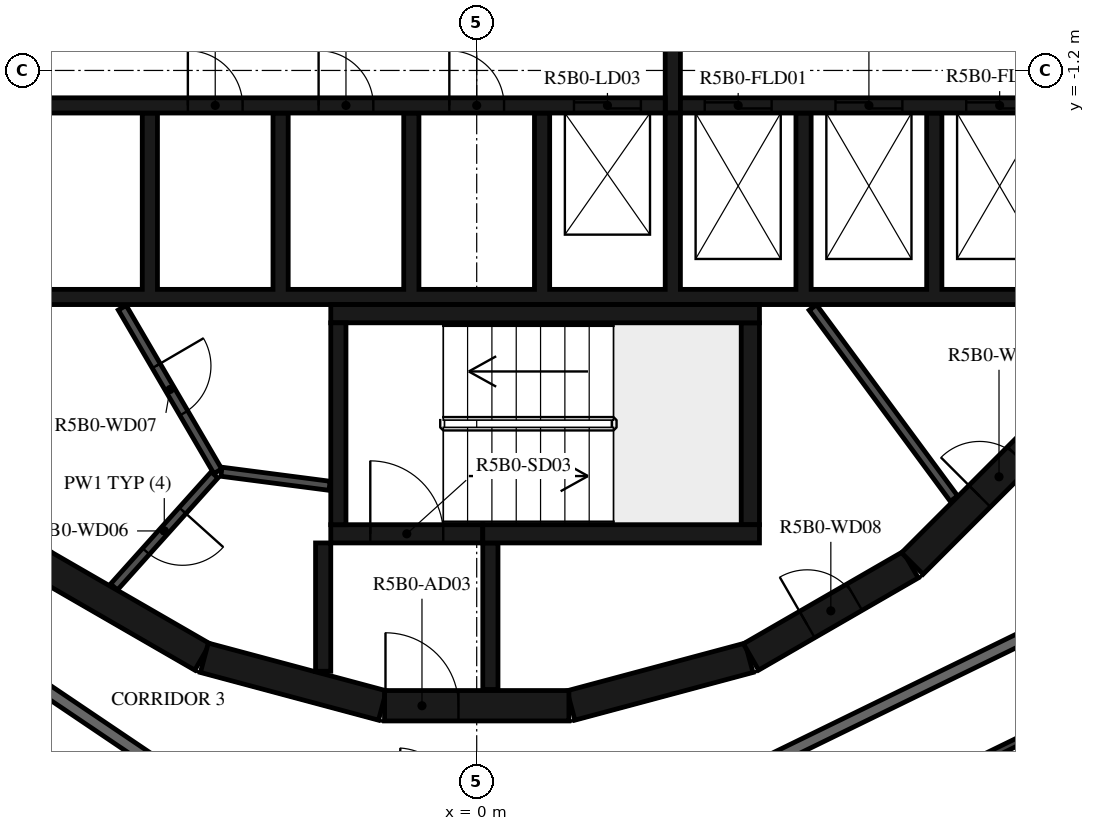
"""IFC4 building model, lengths in metres.
Left out: names, types, materials, properties, quantities, classifications, styles, units other than length and angle.
Written with IfcOpenShell. Run it as: python <this file> out.ifc"""

import sys

from ifc_helpers import new_model, si_unit, direction, frame, frame_2d, origin, place, context, subcontext, project, spatial, polyline, rectangle, outline, extrude, element, fill, save


model = new_model("IFC4")
c1 = context("Model", 3, precision=1e-05, world=origin(), true_north=direction((0.0, 1.0)))
c2 = subcontext(c1, "Body", "Model", "MODEL_VIEW")
j1 = project(units=[si_unit("LENGTHUNIT", "METRE"), si_unit("PLANEANGLEUNIT", "RADIAN")], contexts=[c1])
p1 = place(None, origin())
s1 = spatial("IfcSite", under=j1, at=p1, CompositionType="ELEMENT")
p2 = place(p1, origin())
s2 = spatial("IfcBuilding", under=s1, at=p2, CompositionType="ELEMENT")
p3 = place(p2, frame((0.0, 0.0, 202.4)))
s3 = spatial("IfcBuildingStorey", under=s2, at=p3, CompositionType="ELEMENT", Elevation=202.4)
p4 = place(p3, frame((1.55, -11.643, 0.0), z_axis=(0.0, 0.0, 1.0), x_axis=(0.965948410781, 0.258734743916, 0.0)))
e1 = element("IfcWall", 1, at=p4, inside=s3, PredefinedType="SHEAR", context=c2, shape_type="SweptSolid", body=[
    extrude(rectangle(XDim=3.033, YDim=0.5, at=frame_2d((1.516, 0.0))), origin(), (0.0, 0.0, 1.0), 3.12),
])
p5 = place(p3, frame((4.51, -10.845, 0.0), z_axis=(0.0, 0.0, 1.0), x_axis=(0.865975092491, 0.500087131594, 0.0)))
e2 = element("IfcWall", 2, at=p5, inside=s3, PredefinedType="SHEAR", context=c2, shape_type="SweptSolid", body=[
    extrude(rectangle(XDim=3.033, YDim=0.5, at=frame_2d((1.516, 0.0))), origin(), (0.0, 0.0, 1.0), 3.12),
])
p6 = place(p5, frame((1.066, 0.0, 0.0)))
e3 = element("IfcOpeningElement", 3, at=p6, cuts=e2, PredefinedType="OPENING", context=c2, shape_type="SweptSolid", body=[
    extrude(rectangle(XDim=0.9, YDim=2.1, at=frame_2d((0.45, 1.05))), frame((0.0, 0.26, 0.0), z_axis=(0.0, -1.0, 0.0), x_axis=(1.0, 0.0, 0.0)), (0.0, 0.0, 1.0), 0.52),
])
p7 = place(p3, frame((7.164, -9.308, 0.0), z_axis=(0.0, 0.0, 1.0), x_axis=(0.707106781187, 0.707106781187, 0.0)))
e4 = element("IfcWall", 4, at=p7, inside=s3, PredefinedType="SHEAR", context=c2, shape_type="SweptSolid", body=[
    extrude(rectangle(XDim=3.032, YDim=0.5, at=frame_2d((1.516, 0.0))), origin(), (0.0, 0.0, 1.0), 3.12),
])
p8 = place(p7, frame((1.566, 0.0, 0.0)))
e5 = element("IfcOpeningElement", 5, at=p8, cuts=e4, PredefinedType="OPENING", context=c2, shape_type="SweptSolid", body=[
    extrude(rectangle(XDim=0.9, YDim=2.1, at=frame_2d((0.45, 1.05))), frame((0.0, 0.26, 0.0), z_axis=(0.0, -1.0, 0.0), x_axis=(1.0, 0.0, 0.0)), (0.0, 0.0, 1.0), 0.52),
])
for number, where, z_axis, x_axis in (
    (6, (-7.137, -9.329, 0.0), (0.0, 0.0, 1.0), (0.866, -0.5, 0.0)),
    (7, (-4.479, -10.858, 0.0), (0.0, 0.0, 1.0), (0.966, -0.259, 0.0)),
):
    element("IfcWall", number, at=place(p3, frame(where, z_axis=z_axis, x_axis=x_axis)), inside=s3, PredefinedType="SHEAR", context=c2, shape_type="SweptSolid", body=[
        extrude(rectangle(XDim=3.033, YDim=0.5, at=frame_2d((1.516, 0.0))), origin(), (0.0, 0.0, 1.0), 3.12),
    ])
p9 = place(p3, frame((-1.516, -11.647, 0.0), z_axis=(0.0, 0.0, 1.0), x_axis=(1.0, 0.0, 0.0)))
e8 = element("IfcWall", 8, at=p9, inside=s3, PredefinedType="SHEAR", context=c2, shape_type="SweptSolid", body=[
    extrude(rectangle(XDim=3.033, YDim=0.5, at=frame_2d((1.516, 0.0))), origin(), (0.0, 0.0, 1.0), 3.12),
])
p10 = place(p9, frame((0.016, 0.0, 0.0)))
e9 = element("IfcOpeningElement", 9, at=p10, cuts=e8, PredefinedType="OPENING", context=c2, shape_type="SweptSolid", body=[
    extrude(rectangle(XDim=1.2, YDim=2.1, at=frame_2d((0.6, 1.05))), frame((0.0, 0.26, 0.0), z_axis=(0.0, -1.0, 0.0), x_axis=(1.0, 0.0, 0.0)), (0.0, 0.0, 1.0), 0.52),
])
p11 = place(p3, frame((-2.275, -8.67, 0.0), z_axis=(0.0, 0.0, 1.0), x_axis=(0.0, 1.0, 0.0)))
e10 = element("IfcWall", 10, at=p11, inside=s3, PredefinedType="SHEAR", context=c2, shape_type="SweptSolid", body=[
    extrude(rectangle(XDim=3.32, YDim=0.25, at=frame_2d((1.66, 0.0))), origin(), (0.0, 0.0, 1.0), 3.12),
])
p12 = place(p3, frame((-2.4, -5.2, 0.0), z_axis=(0.0, 0.0, 1.0), x_axis=(1.0, 0.0, 0.0)))
e11 = element("IfcWall", 11, at=p12, inside=s3, PredefinedType="SHEAR", context=c2, shape_type="SweptSolid", body=[
    extrude(rectangle(XDim=7.05, YDim=0.3, at=frame_2d((3.525, 0.0))), origin(), (0.0, 0.0, 1.0), 3.12),
])
p13 = place(p3, frame((4.5, -8.67, 0.0), z_axis=(0.0, 0.0, 1.0), x_axis=(0.0, 1.0, 0.0)))
e12 = element("IfcWall", 12, at=p13, inside=s3, PredefinedType="SHEAR", context=c2, shape_type="SweptSolid", body=[
    extrude(rectangle(XDim=3.32, YDim=0.3, at=frame_2d((1.66, 0.0))), origin(), (0.0, 0.0, 1.0), 3.12),
])
p14 = place(p3, frame((0.1, -8.82, 0.0), z_axis=(0.0, 0.0, 1.0), x_axis=(1.0, 0.0, 0.0)))
e13 = element("IfcWall", 13, at=p14, inside=s3, PredefinedType="SHEAR", context=c2, shape_type="SweptSolid", body=[
    extrude(rectangle(XDim=4.55, YDim=0.3, at=frame_2d((2.275, 0.0))), origin(), (0.0, 0.0, 1.0), 3.12),
])
p15 = place(p3, frame((-2.4, -8.82, 0.0), z_axis=(0.0, 0.0, 1.0), x_axis=(1.0, 0.0, 0.0)))
e14 = element("IfcWall", 14, at=p15, inside=s3, PredefinedType="SHEAR", context=c2, shape_type="SweptSolid", body=[
    extrude(rectangle(XDim=2.5, YDim=0.3, at=frame_2d((1.25, 0.0))), origin(), (0.0, 0.0, 1.0), 3.12),
])
p16 = place(p15, frame((0.65, 0.0, 0.0)))
e15 = element("IfcOpeningElement", 15, at=p16, cuts=e14, PredefinedType="OPENING", context=c2, shape_type="SweptSolid", body=[
    extrude(rectangle(XDim=1.2, YDim=2.1, at=frame_2d((0.6, 1.05))), frame((0.0, 0.16, 0.0), z_axis=(0.0, -1.0, 0.0), x_axis=(1.0, 0.0, 0.0)), (0.0, 0.0, 1.0), 0.32),
])
p17 = place(p3, frame((-2.525, -8.97, 0.0), z_axis=(0.0, 0.0, 1.0), x_axis=(0.0, -1.0, 0.0)))
e16 = element("IfcWall", 16, at=p17, inside=s3, PredefinedType="SHEAR", context=c2, shape_type="SweptSolid", body=[
    extrude(rectangle(XDim=2.11, YDim=0.25, at=frame_2d((1.055, 0.0))), origin(), (0.0, 0.0, 1.0), 3.12),
])
p18 = place(p3, frame((0.225, -8.97, 0.0), z_axis=(0.0, 0.0, 1.0), x_axis=(0.0, -1.0, 0.0)))
e17 = element("IfcWall", 17, at=p18, inside=s3, PredefinedType="SHEAR", context=c2, shape_type="SweptSolid", body=[
    extrude(rectangle(XDim=2.41, YDim=0.25, at=frame_2d((1.205, 0.0))), origin(), (0.0, 0.0, 1.0), 3.12),
])
p19 = place(p3, origin())
e18 = element("IfcWall", 18, at=p19, inside=s3, PredefinedType="SHEAR", context=c2, shape_type="SweptSolid", body=[
    extrude(outline(polyline([(9.8, -5.05), (9.8, -4.8), (9.8, -1.9), (9.55, -1.9), (9.55, -4.8), (7.65, -4.8), (7.65, -1.9), (7.4, -1.9), (7.4, -4.8), (5.5, -4.8), (5.5, -1.9), (5.25, -1.9), (5.25, -4.8), (3.35, -4.8), (3.35, -1.9), (3.1, -1.9), (3.1, -4.8), (1.2, -4.8), (1.2, -1.9), (0.95, -1.9), (0.95, -4.8), (-0.95, -4.8), (-0.95, -1.9), (-1.2, -1.9), (-1.2, -4.8), (-3.1, -4.8), (-3.1, -1.9), (-3.35, -1.9), (-3.35, -4.8), (-5.25, -4.8), (-5.25, -1.9), (-5.5, -1.9), (-5.5, -4.8), (-7.4, -4.8), (-7.4, -1.9), (-7.65, -1.9), (-7.65, -4.8), (-9.55, -4.8), (-9.55, -1.9), (-9.8, -1.9), (-9.8, -4.8), (-9.8, -5.05), (9.8, -5.05)])), origin(), (0.0, 0.0, 1.0), 3.12),
])
p20 = place(p3, frame((-11.28, -1.775, 0.0), z_axis=(0.0, 0.0, 1.0), x_axis=(1.0, 0.0, 0.0)))
e19 = element("IfcWall", 19, at=p20, inside=s3, PredefinedType="SHEAR", context=c2, shape_type="SweptSolid", body=[
    extrude(rectangle(XDim=14.38, YDim=0.25, at=frame_2d((7.19, 0.0))), origin(), (0.0, 0.0, 1.0), 3.12),
])
p21 = place(p20, frame((12.88, 0.0, 0.0)))
e20 = element("IfcOpeningElement", 20, at=p21, cuts=e19, PredefinedType="OPENING", context=c2, shape_type="SweptSolid", body=[
    extrude(rectangle(XDim=1.1, YDim=2.1, at=frame_2d((0.55, 1.05))), frame((0.0, 0.135, 0.0), z_axis=(0.0, -1.0, 0.0), x_axis=(1.0, 0.0, 0.0)), (0.0, 0.0, 1.0), 0.27),
])
p22 = place(p20, frame((6.53, 0.0, 0.0)))
e21 = element("IfcOpeningElement", 21, at=p22, cuts=e19, PredefinedType="OPENING", context=c2, shape_type="SweptSolid", body=[
    extrude(rectangle(XDim=0.9, YDim=2.1, at=frame_2d((0.45, 1.05))), frame((0.0, 0.135, 0.0), z_axis=(0.0, -1.0, 0.0), x_axis=(1.0, 0.0, 0.0)), (0.0, 0.0, 1.0), 0.27),
])
p23 = place(p20, frame((8.68, 0.0, 0.0)))
e22 = element("IfcOpeningElement", 22, at=p23, cuts=e19, PredefinedType="OPENING", context=c2, shape_type="SweptSolid", body=[
    extrude(rectangle(XDim=0.9, YDim=2.1, at=frame_2d((0.45, 1.05))), frame((0.0, 0.135, 0.0), z_axis=(0.0, -1.0, 0.0), x_axis=(1.0, 0.0, 0.0)), (0.0, 0.0, 1.0), 0.27),
])
p24 = place(p20, frame((10.83, 0.0, 0.0)))
e23 = element("IfcOpeningElement", 23, at=p24, cuts=e19, PredefinedType="OPENING", context=c2, shape_type="SweptSolid", body=[
    extrude(rectangle(XDim=0.9, YDim=2.1, at=frame_2d((0.45, 1.05))), frame((0.0, 0.135, 0.0), z_axis=(0.0, -1.0, 0.0), x_axis=(1.0, 0.0, 0.0)), (0.0, 0.0, 1.0), 0.27),
])
p25 = place(p3, frame((3.35, -1.775, 0.0), z_axis=(0.0, 0.0, 1.0), x_axis=(1.0, 0.0, 0.0)))
e24 = element("IfcWall", 24, at=p25, inside=s3, PredefinedType="SHEAR", context=c2, shape_type="SweptSolid", body=[
    extrude(rectangle(XDim=7.93, YDim=0.25, at=frame_2d((3.965, 0.0))), origin(), (0.0, 0.0, 1.0), 3.12),
])
p26 = place(p25, frame((0.4, 0.0, 0.0)))
e25 = element("IfcOpeningElement", 25, at=p26, cuts=e24, PredefinedType="OPENING", context=c2, shape_type="SweptSolid", body=[
    extrude(rectangle(XDim=1.1, YDim=2.4, at=frame_2d((0.55, 1.2))), frame((0.0, 0.135, 0.0), z_axis=(0.0, -1.0, 0.0), x_axis=(1.0, 0.0, 0.0)), (0.0, 0.0, 1.0), 0.27),
])
p27 = place(p25, frame((2.55, 0.0, 0.0)))
e26 = element("IfcOpeningElement", 26, at=p27, cuts=e24, PredefinedType="OPENING", context=c2, shape_type="SweptSolid", body=[
    extrude(rectangle(XDim=1.1, YDim=2.4, at=frame_2d((0.55, 1.2))), frame((0.0, 0.135, 0.0), z_axis=(0.0, -1.0, 0.0), x_axis=(1.0, 0.0, 0.0)), (0.0, 0.0, 1.0), 0.27),
])
p28 = place(p25, frame((4.7, 0.0, 0.0)))
e27 = element("IfcOpeningElement", 27, at=p28, cuts=e24, PredefinedType="OPENING", context=c2, shape_type="SweptSolid", body=[
    extrude(rectangle(XDim=1.1, YDim=2.4, at=frame_2d((0.55, 1.2))), frame((0.0, 0.135, 0.0), z_axis=(0.0, -1.0, 0.0), x_axis=(1.0, 0.0, 0.0)), (0.0, 0.0, 1.0), 0.27),
])
p29 = place(p3, frame((3.225, -1.9, 0.0), z_axis=(0.0, 0.0, 1.0), x_axis=(0.0, 1.0, 0.0)))
e28 = element("IfcWall", 28, at=p29, inside=s3, PredefinedType="SHEAR", context=c2, shape_type="SweptSolid", body=[
    extrude(rectangle(XDim=3.8, YDim=0.25, at=frame_2d((1.9, 0.0))), origin(), (0.0, 0.0, 1.0), 3.12),
])
p30 = place(p3, frame((5.528, -5.098, 0.0), z_axis=(0.0, 0.0, 1.0), x_axis=(0.594034318069, -0.804439698769, 0.0)))
e29 = element("IfcWall", 29, at=p30, inside=s3, PredefinedType="PARTITIONING", context=c2, shape_type="SweptSolid", body=[
    extrude(rectangle(XDim=3.907, YDim=0.15, at=frame_2d((1.953, 0.0))), origin(), (0.0, 0.0, 1.0), 3.12),
])
p31 = place(p3, frame((-5.829, -5.102, 0.0), z_axis=(0.0, 0.0, 1.0), x_axis=(0.504480008384, -0.863423373057, 0.0)))
e30 = element("IfcWall", 30, at=p31, inside=s3, PredefinedType="PARTITIONING", context=c2, shape_type="SweptSolid", body=[
    extrude(rectangle(XDim=3.115, YDim=0.15, at=frame_2d((1.558, 0.0))), origin(), (0.0, 0.0, 1.0), 3.12),
])
p32 = place(p31, frame((1.107, 0.0, 0.0)))
e31 = element("IfcOpeningElement", 31, at=p32, cuts=e30, PredefinedType="OPENING", context=c2, shape_type="SweptSolid", body=[
    extrude(rectangle(XDim=0.9, YDim=2.1, at=frame_2d((0.45, 1.05))), frame((0.0, 0.085, 0.0), z_axis=(0.0, -1.0, 0.0), x_axis=(1.0, 0.0, 0.0)), (0.0, 0.0, 1.0), 0.17),
])
p33 = place(p3, frame((-4.311, -7.851, 0.0), z_axis=(0.0, 0.0, 1.0), x_axis=(-0.667869133096, -0.744278725383, 0.0)))
e32 = element("IfcWall", 32, at=p33, inside=s3, PredefinedType="PARTITIONING", context=c2, shape_type="SweptSolid", body=[
    extrude(rectangle(XDim=2.476, YDim=0.15, at=frame_2d((1.238, 0.0))), origin(), (0.0, 0.0, 1.0), 3.12),
])
p34 = place(p33, frame((0.788, 0.0, 0.0)))
e33 = element("IfcOpeningElement", 33, at=p34, cuts=e32, PredefinedType="OPENING", context=c2, shape_type="SweptSolid", body=[
    extrude(rectangle(XDim=0.9, YDim=2.1, at=frame_2d((0.45, 1.05))), frame((0.0, 0.085, 0.0), z_axis=(0.0, -1.0, 0.0), x_axis=(1.0, 0.0, 0.0)), (0.0, 0.0, 1.0), 0.17),
])
p35 = place(p3, frame((-4.198, -7.799, 0.0), z_axis=(0.0, 0.0, 1.0), x_axis=(0.991686747293, -0.128675542523, 0.0)))
e34 = element("IfcWall", 34, at=p35, inside=s3, PredefinedType="PARTITIONING", context=c2, shape_type="SweptSolid", body=[
    extrude(rectangle(XDim=1.793, YDim=0.15, at=frame_2d((0.896, 0.0))), origin(), (0.0, 0.0, 1.0), 3.12),
])
p36 = place(p3, frame((-10.47, -9.101, 0.0), z_axis=(0.0, 0.0, 1.0), x_axis=(0.829035841718, -0.559195469534, 0.0)))
e35 = element("IfcWall", 35, at=p36, inside=s3, PredefinedType="STANDARD", context=c2, shape_type="SweptSolid", body=[
    extrude(rectangle(XDim=7.181, YDim=0.2, at=frame_2d((3.591, 0.0))), origin(), (0.0, 0.0, 1.0), 3.12),
])
p37 = place(p36, frame((2.39, 0.0, 0.0)))
e36 = element("IfcOpeningElement", 36, at=p37, cuts=e35, PredefinedType="OPENING", context=c2, shape_type="SweptSolid", body=[
    extrude(rectangle(XDim=1.0, YDim=2.1, at=frame_2d((0.5, 1.05))), frame((0.0, 0.11, 0.0), z_axis=(0.0, -1.0, 0.0), x_axis=(1.0, 0.0, 0.0)), (0.0, 0.0, 1.0), 0.22),
])
p38 = place(p3, frame((2.647, -13.618, 0.0), z_axis=(0.0, 0.0, 1.0), x_axis=(0.898796543751, 0.438366026218, 0.0)))
e37 = element("IfcWall", 37, at=p38, inside=s3, PredefinedType="STANDARD", context=c2, shape_type="SweptSolid", body=[
    extrude(rectangle(XDim=7.181, YDim=0.2, at=frame_2d((3.591, 0.0))), origin(), (0.0, 0.0, 1.0), 3.12),
])
p39 = place(p38, frame((0.2, 0.0, 0.0)))
e38 = element("IfcOpeningElement", 38, at=p39, cuts=e37, PredefinedType="OPENING", context=c2, shape_type="SweptSolid", body=[
    extrude(rectangle(XDim=1.0, YDim=2.1, at=frame_2d((0.5, 1.05))), frame((0.0, 0.11, 0.0), z_axis=(0.0, -1.0, 0.0), x_axis=(1.0, 0.0, 0.0)), (0.0, 0.0, 1.0), 0.22),
])
p40 = place(p3, frame((-11.642, -10.12, 0.0), z_axis=(0.0, 0.0, 1.0), x_axis=(0.829033377599, -0.559199122698, 0.0)))
e39 = element("IfcWall", 39, at=p40, inside=s3, PredefinedType="PARTITIONING", context=c2, shape_type="SweptSolid", body=[
    extrude(rectangle(XDim=5.638, YDim=0.12, at=frame_2d((2.819, 0.0))), origin(), (0.0, 0.0, 1.0), 3.12),
])
p41 = place(p40, frame((0.2, 0.0, 0.0)))
e40 = element("IfcOpeningElement", 40, at=p41, cuts=e39, PredefinedType="OPENING", context=c2, shape_type="SweptSolid", body=[
    extrude(rectangle(XDim=0.9, YDim=2.1, at=frame_2d((0.45, 1.05))), frame((0.0, 0.07, 0.0), z_axis=(0.0, -1.0, 0.0), x_axis=(1.0, 0.0, 0.0)), (0.0, 0.0, 1.0), 0.14),
])
p42 = place(p40, frame((4.192, 0.0, 0.0)))
e41 = element("IfcOpeningElement", 41, at=p42, cuts=e39, PredefinedType="OPENING", context=c2, shape_type="SweptSolid", body=[
    extrude(rectangle(XDim=0.9, YDim=2.1, at=frame_2d((0.45, 1.05))), frame((0.0, 0.07, 0.0), z_axis=(0.0, -1.0, 0.0), x_axis=(1.0, 0.0, 0.0)), (0.0, 0.0, 1.0), 0.14),
])
p43 = place(p3, frame((3.074, -15.078, 0.0), z_axis=(0.0, 0.0, 1.0), x_axis=(0.898793586225, 0.43837209008, 0.0)))
e42 = element("IfcWall", 42, at=p43, inside=s3, PredefinedType="PARTITIONING", context=c2, shape_type="SweptSolid", body=[
    extrude(rectangle(XDim=7.839, YDim=0.12, at=frame_2d((3.92, 0.0))), origin(), (0.0, 0.0, 1.0), 3.12),
])
p44 = place(p43, frame((0.2, 0.0, 0.0)))
e43 = element("IfcOpeningElement", 43, at=p44, cuts=e42, PredefinedType="OPENING", context=c2, shape_type="SweptSolid", body=[
    extrude(rectangle(XDim=0.9, YDim=2.1, at=frame_2d((0.45, 1.05))), frame((0.0, 0.07, 0.0), z_axis=(0.0, -1.0, 0.0), x_axis=(1.0, 0.0, 0.0)), (0.0, 0.0, 1.0), 0.14),
])
p45 = place(p16, origin())
e44 = element("IfcDoor", 44, at=p45, inside=s3, OperationType="SINGLE_SWING_LEFT", PredefinedType="DOOR", context=c2, shape_type="SweptSolid", body=[
    extrude(rectangle(XDim=1.2, YDim=2.1, at=frame_2d((0.6, 1.05))), frame((0.0, 0.025, 0.0), z_axis=(0.0, -1.0, 0.0), x_axis=(1.0, 0.0, 0.0)), (0.0, 0.0, 1.0), 0.05),
])
fill(e15, e44)
p46 = place(p10, origin())
e45 = element("IfcDoor", 45, at=p46, inside=s3, OperationType="SINGLE_SWING_RIGHT", PredefinedType="DOOR", context=c2, shape_type="SweptSolid", body=[
    extrude(rectangle(XDim=1.2, YDim=2.1, at=frame_2d((0.6, 1.05))), frame((0.0, 0.025, 0.0), z_axis=(0.0, -1.0, 0.0), x_axis=(1.0, 0.0, 0.0)), (0.0, 0.0, 1.0), 0.05),
])
fill(e9, e45)
p47 = place(p21, origin())
e46 = element("IfcDoor", 46, at=p47, inside=s3, OperationType="DOUBLE_DOOR_SLIDING", PredefinedType="DOOR", context=c2, shape_type="SweptSolid", body=[
    extrude(rectangle(XDim=1.1, YDim=2.1, at=frame_2d((0.55, 1.05))), frame((0.0, 0.025, 0.0), z_axis=(0.0, -1.0, 0.0), x_axis=(1.0, 0.0, 0.0)), (0.0, 0.0, 1.0), 0.05),
])
fill(e20, e46)
p48 = place(p26, origin())
e47 = element("IfcDoor", 47, at=p48, inside=s3, OperationType="DOUBLE_DOOR_SLIDING", PredefinedType="DOOR", context=c2, shape_type="SweptSolid", body=[
    extrude(rectangle(XDim=1.1, YDim=2.4, at=frame_2d((0.55, 1.2))), frame((0.0, 0.025, 0.0), z_axis=(0.0, -1.0, 0.0), x_axis=(1.0, 0.0, 0.0)), (0.0, 0.0, 1.0), 0.05),
])
fill(e25, e47)
p49 = place(p27, origin())
e48 = element("IfcDoor", 48, at=p49, inside=s3, OperationType="DOUBLE_DOOR_SLIDING", PredefinedType="DOOR", context=c2, shape_type="SweptSolid", body=[
    extrude(rectangle(XDim=1.1, YDim=2.4, at=frame_2d((0.55, 1.2))), frame((0.0, 0.025, 0.0), z_axis=(0.0, -1.0, 0.0), x_axis=(1.0, 0.0, 0.0)), (0.0, 0.0, 1.0), 0.05),
])
fill(e26, e48)
p50 = place(p28, origin())
e49 = element("IfcDoor", 49, at=p50, inside=s3, OperationType="DOUBLE_DOOR_SLIDING", PredefinedType="DOOR", context=c2, shape_type="SweptSolid", body=[
    extrude(rectangle(XDim=1.1, YDim=2.4, at=frame_2d((0.55, 1.2))), frame((0.0, 0.025, 0.0), z_axis=(0.0, -1.0, 0.0), x_axis=(1.0, 0.0, 0.0)), (0.0, 0.0, 1.0), 0.05),
])
fill(e27, e49)
p51 = place(p22, origin())
e50 = element("IfcDoor", 50, at=p51, inside=s3, OperationType="SINGLE_SWING_LEFT", PredefinedType="DOOR", context=c2, shape_type="SweptSolid", body=[
    extrude(rectangle(XDim=0.9, YDim=2.1, at=frame_2d((0.45, 1.05))), frame((0.0, 0.025, 0.0), z_axis=(0.0, -1.0, 0.0), x_axis=(1.0, 0.0, 0.0)), (0.0, 0.0, 1.0), 0.05),
])
fill(e21, e50)
p52 = place(p23, origin())
e51 = element("IfcDoor", 51, at=p52, inside=s3, OperationType="SINGLE_SWING_RIGHT", PredefinedType="DOOR", context=c2, shape_type="SweptSolid", body=[
    extrude(rectangle(XDim=0.9, YDim=2.1, at=frame_2d((0.45, 1.05))), frame((0.0, 0.025, 0.0), z_axis=(0.0, -1.0, 0.0), x_axis=(1.0, 0.0, 0.0)), (0.0, 0.0, 1.0), 0.05),
])
fill(e22, e51)
p53 = place(p24, origin())
e52 = element("IfcDoor", 52, at=p53, inside=s3, OperationType="SINGLE_SWING_LEFT", PredefinedType="DOOR", context=c2, shape_type="SweptSolid", body=[
    extrude(rectangle(XDim=0.9, YDim=2.1, at=frame_2d((0.45, 1.05))), frame((0.0, 0.025, 0.0), z_axis=(0.0, -1.0, 0.0), x_axis=(1.0, 0.0, 0.0)), (0.0, 0.0, 1.0), 0.05),
])
fill(e23, e52)
p54 = place(p34, origin())
e53 = element("IfcDoor", 53, at=p54, inside=s3, OperationType="SINGLE_SWING_RIGHT", PredefinedType="DOOR", context=c2, shape_type="SweptSolid", body=[
    extrude(rectangle(XDim=0.9, YDim=2.1, at=frame_2d((0.45, 1.05))), frame((0.0, 0.025, 0.0), z_axis=(0.0, -1.0, 0.0), x_axis=(1.0, 0.0, 0.0)), (0.0, 0.0, 1.0), 0.05),
])
fill(e33, e53)
p55 = place(p32, origin())
e54 = element("IfcDoor", 54, at=p55, inside=s3, OperationType="SINGLE_SWING_LEFT", PredefinedType="DOOR", context=c2, shape_type="SweptSolid", body=[
    extrude(rectangle(XDim=0.9, YDim=2.1, at=frame_2d((0.45, 1.05))), frame((0.0, 0.025, 0.0), z_axis=(0.0, -1.0, 0.0), x_axis=(1.0, 0.0, 0.0)), (0.0, 0.0, 1.0), 0.05),
])
fill(e31, e54)
p56 = place(p6, origin())
e55 = element("IfcDoor", 55, at=p56, inside=s3, OperationType="SINGLE_SWING_RIGHT", PredefinedType="DOOR", context=c2, shape_type="SweptSolid", body=[
    extrude(rectangle(XDim=0.9, YDim=2.1, at=frame_2d((0.45, 1.05))), frame((0.0, 0.025, 0.0), z_axis=(0.0, -1.0, 0.0), x_axis=(1.0, 0.0, 0.0)), (0.0, 0.0, 1.0), 0.05),
])
fill(e3, e55)
p57 = place(p8, origin())
e56 = element("IfcDoor", 56, at=p57, inside=s3, OperationType="SINGLE_SWING_LEFT", PredefinedType="DOOR", context=c2, shape_type="SweptSolid", body=[
    extrude(rectangle(XDim=0.9, YDim=2.1, at=frame_2d((0.45, 1.05))), frame((0.0, 0.025, 0.0), z_axis=(0.0, -1.0, 0.0), x_axis=(1.0, 0.0, 0.0)), (0.0, 0.0, 1.0), 0.05),
])
fill(e5, e56)
save(model, sys.argv[1])
